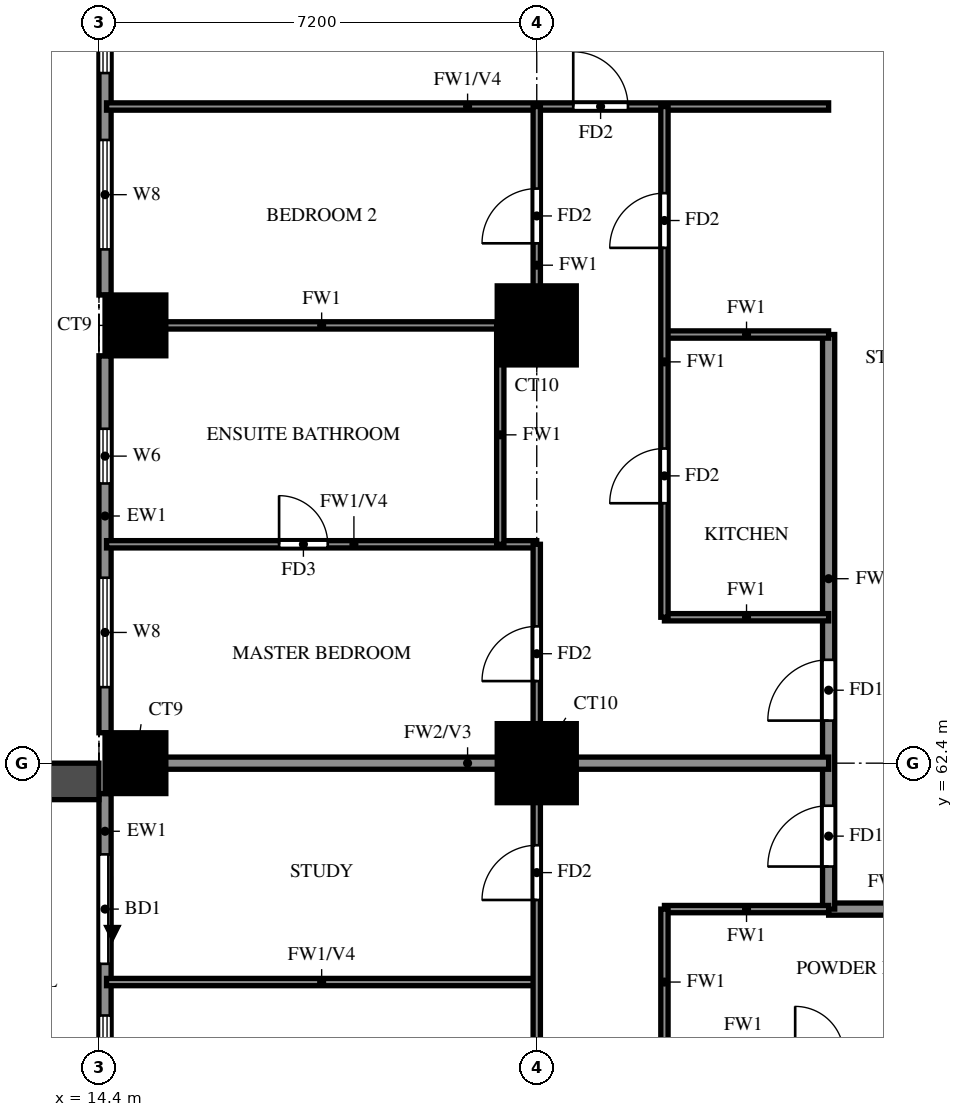
"""IFC4 building model, lengths in metres.
Left out: names, types, materials, properties, quantities, classifications, styles, units other than length and angle.
Written with IfcOpenShell. Run it as: python <this file> out.ifc"""

import sys

from ifc_helpers import new_model, si_unit, direction, frame, frame_2d, origin, origin_2d, place, context, subcontext, project, spatial, rectangle, extrude, source, transform, mapped, element, fill, save


model = new_model("IFC4")
c1 = context("Model", 3, precision=1e-05, world=origin(), true_north=direction((0.0, 1.0)))
c2 = subcontext(c1, "Body", "Model", "MODEL_VIEW")
j1 = project(units=[si_unit("LENGTHUNIT", "METRE"), si_unit("PLANEANGLEUNIT", "RADIAN")], contexts=[c1])
p1 = place(None, origin())
s1 = spatial("IfcSite", under=j1, at=p1, CompositionType="ELEMENT")
p2 = place(p1, origin())
s2 = spatial("IfcBuilding", under=s1, at=p2, CompositionType="ELEMENT")
p3 = place(p2, frame((0.0, 0.0, 90.0)))
s3 = spatial("IfcBuildingStorey", under=s2, at=p3, CompositionType="ELEMENT", Elevation=90.0)
m1 = source(origin(), c2, "Body", "SweptSolid", [
    extrude(rectangle(XDim=1.0, YDim=1.0, at=origin_2d()), origin(), (0.0, 0.0, 1.0), 3.18),
])
p4 = place(p3, frame((15.0, 62.4, 0.0), z_axis=(0.0, 0.0, 1.0), x_axis=(1.0, 0.0, 0.0)))
e1 = element("IfcColumn", 1, at=p4, inside=s3, PredefinedType="COLUMN", context=c2, shape_type="MappedRepresentation", body=[
    mapped(m1, transform((0.0, 0.0, 0.0))),
])
m2 = source(origin(), c2, "Body", "SweptSolid", [
    extrude(rectangle(XDim=1.3, YDim=1.3, at=origin_2d()), origin(), (0.0, 0.0, 1.0), 3.18),
])
p5 = place(p3, frame((21.6, 62.4, 0.0), z_axis=(0.0, 0.0, 1.0), x_axis=(1.0, 0.0, 0.0)))
e2 = element("IfcColumn", 2, at=p5, inside=s3, PredefinedType="COLUMN", context=c2, shape_type="MappedRepresentation", body=[
    mapped(m2, transform((0.0, 0.0, 0.0))),
])
p6 = place(p3, frame((15.0, 69.6, 0.0), z_axis=(0.0, 0.0, 1.0), x_axis=(1.0, 0.0, 0.0)))
e3 = element("IfcColumn", 3, at=p6, inside=s3, PredefinedType="COLUMN", context=c2, shape_type="MappedRepresentation", body=[
    mapped(m1, transform((0.0, 0.0, 0.0))),
])
p7 = place(p3, frame((21.6, 69.6, 0.0), z_axis=(0.0, 0.0, 1.0), x_axis=(1.0, 0.0, 0.0)))
e4 = element("IfcColumn", 4, at=p7, inside=s3, PredefinedType="COLUMN", context=c2, shape_type="MappedRepresentation", body=[
    mapped(m2, transform((0.0, 0.0, 0.0))),
])
p8 = place(p3, frame((14.5, 76.3, 0.0), z_axis=(0.0, 0.0, 1.0), x_axis=(0.0, -1.0, 0.0)))
e5 = element("IfcWall", 5, at=p8, inside=s3, PredefinedType="SOLIDWALL", context=c2, shape_type="SweptSolid", body=[
    extrude(rectangle(XDim=6.2, YDim=0.2, at=frame_2d((3.1, 0.0))), origin(), (0.0, 0.0, 1.0), 3.18),
])
p9 = place(p8, frame((3.65, 0.0, 0.6)))
e6 = element("IfcOpeningElement", 6, at=p9, cuts=e5, PredefinedType="OPENING", context=c2, shape_type="SweptSolid", body=[
    extrude(rectangle(XDim=1.8, YDim=2.4, at=frame_2d((0.9, 1.2))), frame((0.0, 0.11, 0.0), z_axis=(0.0, -1.0, 0.0), x_axis=(1.0, 0.0, 0.0)), (0.0, 0.0, 1.0), 0.22),
])
p10 = place(p8, frame((0.75, 0.0, 0.6)))
e7 = element("IfcOpeningElement", 7, at=p10, cuts=e5, PredefinedType="OPENING", context=c2, shape_type="SweptSolid", body=[
    extrude(rectangle(XDim=1.8, YDim=2.4, at=frame_2d((0.9, 1.2))), frame((0.0, 0.11, 0.0), z_axis=(0.0, -1.0, 0.0), x_axis=(1.0, 0.0, 0.0)), (0.0, 0.0, 1.0), 0.22),
])
p11 = place(p3, frame((14.5, 69.1, 0.0), z_axis=(0.0, 0.0, 1.0), x_axis=(0.0, -1.0, 0.0)))
e8 = element("IfcWall", 8, at=p11, inside=s3, PredefinedType="SOLIDWALL", context=c2, shape_type="SweptSolid", body=[
    extrude(rectangle(XDim=6.2, YDim=0.2, at=frame_2d((3.1, 0.0))), origin(), (0.0, 0.0, 1.0), 3.18),
])
p12 = place(p11, frame((3.65, 0.0, 0.6)))
e9 = element("IfcOpeningElement", 9, at=p12, cuts=e8, PredefinedType="OPENING", context=c2, shape_type="SweptSolid", body=[
    extrude(rectangle(XDim=1.8, YDim=2.4, at=frame_2d((0.9, 1.2))), frame((0.0, 0.11, 0.0), z_axis=(0.0, -1.0, 0.0), x_axis=(1.0, 0.0, 0.0)), (0.0, 0.0, 1.0), 0.22),
])
p13 = place(p11, frame((1.2, 0.0, 1.5)))
e10 = element("IfcOpeningElement", 10, at=p13, cuts=e8, PredefinedType="OPENING", context=c2, shape_type="SweptSolid", body=[
    extrude(rectangle(XDim=0.9, YDim=0.9, at=frame_2d((0.45, 0.45))), frame((0.0, 0.11, 0.0), z_axis=(0.0, -1.0, 0.0), x_axis=(1.0, 0.0, 0.0)), (0.0, 0.0, 1.0), 0.22),
])
p14 = place(p3, frame((14.5, 61.9, 0.0), z_axis=(0.0, 0.0, 1.0), x_axis=(0.0, -1.0, 0.0)))
e11 = element("IfcWall", 11, at=p14, inside=s3, PredefinedType="SOLIDWALL", context=c2, shape_type="SweptSolid", body=[
    extrude(rectangle(XDim=6.2, YDim=0.2, at=frame_2d((3.1, 0.0))), origin(), (0.0, 0.0, 1.0), 3.18),
])
p15 = place(p14, frame((1.0, 0.0, 0.0)))
e12 = element("IfcOpeningElement", 12, at=p15, cuts=e11, PredefinedType="OPENING", context=c2, shape_type="SweptSolid", body=[
    extrude(rectangle(XDim=1.8, YDim=2.4, at=frame_2d((0.9, 1.2))), frame((0.0, 0.11, 0.0), z_axis=(0.0, -1.0, 0.0), x_axis=(1.0, 0.0, 0.0)), (0.0, 0.0, 1.0), 0.22),
])
p16 = place(p14, frame((3.65, 0.0, 0.6)))
e13 = element("IfcOpeningElement", 13, at=p16, cuts=e11, PredefinedType="OPENING", context=c2, shape_type="SweptSolid", body=[
    extrude(rectangle(XDim=1.8, YDim=2.4, at=frame_2d((0.9, 1.2))), frame((0.0, 0.11, 0.0), z_axis=(0.0, -1.0, 0.0), x_axis=(1.0, 0.0, 0.0)), (0.0, 0.0, 1.0), 0.22),
])
p17 = place(p3, frame((14.4, 62.1, 0.0), z_axis=(0.0, 0.0, 1.0), x_axis=(-1.0, 0.0, 0.0)))
e14 = element("IfcWall", 14, at=p17, inside=s3, PredefinedType="SOLIDWALL", context=c2, shape_type="SweptSolid", body=[
    extrude(rectangle(XDim=2.7, YDim=0.6, at=frame_2d((1.35, 0.0))), origin(), (0.0, 0.0, 1.0), 2.85),
])
p18 = place(p3, frame((26.4, 60.0, 0.0), z_axis=(0.0, 0.0, 1.0), x_axis=(1.0, 0.0, 0.0)))
e15 = element("IfcWall", 15, at=p18, inside=s3, PredefinedType="SOLIDWALL", context=c2, shape_type="SweptSolid", body=[
    extrude(rectangle(XDim=2.4, YDim=0.2, at=frame_2d((1.2, 0.0))), origin(), (0.0, 0.0, 1.0), 3.18),
])
p19 = place(p3, frame((26.4, 60.0, 0.0), z_axis=(0.0, 0.0, 1.0), x_axis=(0.0, 1.0, 0.0)))
e16 = element("IfcWall", 16, at=p19, inside=s3, PredefinedType="SOLIDWALL", context=c2, shape_type="SweptSolid", body=[
    extrude(rectangle(XDim=9.45, YDim=0.2, at=frame_2d((4.725, 0.0))), origin(), (0.0, 0.0, 1.0), 3.18),
])
p20 = place(p19, frame((0.7, 0.0, 0.0)))
e17 = element("IfcOpeningElement", 17, at=p20, cuts=e16, PredefinedType="OPENING", context=c2, shape_type="SweptSolid", body=[
    extrude(rectangle(XDim=1.0, YDim=2.1, at=frame_2d((0.5, 1.05))), frame((0.0, 0.11, 0.0), z_axis=(0.0, -1.0, 0.0), x_axis=(1.0, 0.0, 0.0)), (0.0, 0.0, 1.0), 0.22),
])
p21 = place(p19, frame((3.1, 0.0, 0.0)))
e18 = element("IfcOpeningElement", 18, at=p21, cuts=e16, PredefinedType="OPENING", context=c2, shape_type="SweptSolid", body=[
    extrude(rectangle(XDim=1.0, YDim=2.1, at=frame_2d((0.5, 1.05))), frame((0.0, 0.11, 0.0), z_axis=(0.0, -1.0, 0.0), x_axis=(1.0, 0.0, 0.0)), (0.0, 0.0, 1.0), 0.22),
])
p22 = place(p3, frame((14.525, 62.4, 0.0), z_axis=(0.0, 0.0, 1.0), x_axis=(1.0, 0.0, 0.0)))
e19 = element("IfcWall", 19, at=p22, inside=s3, PredefinedType="SOLIDWALL", context=c2, shape_type="SweptSolid", body=[
    extrude(rectangle(XDim=11.875, YDim=0.2, at=frame_2d((5.938, 0.0))), origin(), (0.0, 0.0, 1.0), 3.18),
])
p23 = place(p3, frame((14.525, 58.8, 0.0), z_axis=(0.0, 0.0, 1.0), x_axis=(1.0, 0.0, 0.0)))
e20 = element("IfcWall", 20, at=p23, inside=s3, PredefinedType="PARTITIONING", context=c2, shape_type="SweptSolid", body=[
    extrude(rectangle(XDim=7.075, YDim=0.12, at=frame_2d((3.538, 0.0))), origin(), (0.0, 0.0, 1.0), 2.28),
])
for number, where, z_axis, x_axis in (
    (21, (23.7, 60.0, 0.0), (0.0, 0.0, 1.0), (1.0, 0.0, 0.0)),
    (22, (23.7, 64.8, 0.0), (0.0, 0.0, 1.0), (1.0, 0.0, 0.0)),
):
    element("IfcWall", number, at=place(p3, frame(where, z_axis=z_axis, x_axis=x_axis)), inside=s3, PredefinedType="PARTITIONING", context=c2, shape_type="SweptSolid", body=[
        extrude(rectangle(XDim=2.7, YDim=0.12, at=frame_2d((1.35, 0.0))), origin(), (0.0, 0.0, 1.0), 3.18),
    ])
p24 = place(p3, frame((14.525, 66.0, 0.0), z_axis=(0.0, 0.0, 1.0), x_axis=(1.0, 0.0, 0.0)))
e23 = element("IfcWall", 23, at=p24, inside=s3, PredefinedType="PARTITIONING", context=c2, shape_type="SweptSolid", body=[
    extrude(rectangle(XDim=7.075, YDim=0.12, at=frame_2d((3.538, 0.0))), origin(), (0.0, 0.0, 1.0), 2.28),
])
p25 = place(p24, frame((2.837, 0.0, 0.0)))
e24 = element("IfcOpeningElement", 24, at=p25, cuts=e23, PredefinedType="OPENING", context=c2, shape_type="SweptSolid", body=[
    extrude(rectangle(XDim=0.8, YDim=2.1, at=frame_2d((0.4, 1.05))), frame((0.0, 0.07, 0.0), z_axis=(0.0, -1.0, 0.0), x_axis=(1.0, 0.0, 0.0)), (0.0, 0.0, 1.0), 0.14),
])
p26 = place(p3, frame((23.7, 69.45, 0.0), z_axis=(0.0, 0.0, 1.0), x_axis=(1.0, 0.0, 0.0)))
e25 = element("IfcWall", 25, at=p26, inside=s3, PredefinedType="PARTITIONING", context=c2, shape_type="SweptSolid", body=[
    extrude(rectangle(XDim=2.7, YDim=0.12, at=frame_2d((1.35, 0.0))), origin(), (0.0, 0.0, 1.0), 3.18),
])
p27 = place(p3, frame((14.525, 69.6, 0.0), z_axis=(0.0, 0.0, 1.0), x_axis=(1.0, 0.0, 0.0)))
e26 = element("IfcWall", 26, at=p27, inside=s3, PredefinedType="PARTITIONING", context=c2, shape_type="SweptSolid", body=[
    extrude(rectangle(XDim=7.075, YDim=0.12, at=frame_2d((3.538, 0.0))), origin(), (0.0, 0.0, 1.0), 3.18),
])
p28 = place(p3, frame((14.525, 73.2, 0.0), z_axis=(0.0, 0.0, 1.0), x_axis=(1.0, 0.0, 0.0)))
e27 = element("IfcWall", 27, at=p28, inside=s3, PredefinedType="PARTITIONING", context=c2, shape_type="SweptSolid", body=[
    extrude(rectangle(XDim=11.875, YDim=0.12, at=frame_2d((5.938, 0.0))), origin(), (0.0, 0.0, 1.0), 2.28),
])
p29 = place(p28, frame((7.675, 0.0, 0.0)))
e28 = element("IfcOpeningElement", 28, at=p29, cuts=e27, PredefinedType="OPENING", context=c2, shape_type="SweptSolid", body=[
    extrude(rectangle(XDim=0.9, YDim=2.1, at=frame_2d((0.45, 1.05))), frame((0.0, 0.07, 0.0), z_axis=(0.0, -1.0, 0.0), x_axis=(1.0, 0.0, 0.0)), (0.0, 0.0, 1.0), 0.14),
])
p30 = place(p3, frame((21.0, 66.0, 0.0), z_axis=(0.0, 0.0, 1.0), x_axis=(0.0, 1.0, 0.0)))
e29 = element("IfcWall", 29, at=p30, inside=s3, PredefinedType="PARTITIONING", context=c2, shape_type="SweptSolid", body=[
    extrude(rectangle(XDim=3.6, YDim=0.12, at=frame_2d((1.8, 0.0))), origin(), (0.0, 0.0, 1.0), 3.18),
])
p31 = place(p3, frame((21.6, 33.725, 0.0), z_axis=(0.0, 0.0, 1.0), x_axis=(0.0, 1.0, 0.0)))
e30 = element("IfcWall", 30, at=p31, inside=s3, PredefinedType="PARTITIONING", context=c2, shape_type="SweptSolid", body=[
    extrude(rectangle(XDim=32.275, YDim=0.12, at=frame_2d((16.137, 0.0))), origin(), (0.0, 0.0, 1.0), 3.18),
])
p32 = place(p31, frame((7.775, 0.0, 0.0)))
e31 = element("IfcOpeningElement", 31, at=p32, cuts=e30, PredefinedType="OPENING", context=c2, shape_type="SweptSolid", body=[
    extrude(rectangle(XDim=0.9, YDim=2.1, at=frame_2d((0.45, 1.05))), frame((0.0, 0.07, 0.0), z_axis=(0.0, -1.0, 0.0), x_axis=(1.0, 0.0, 0.0)), (0.0, 0.0, 1.0), 0.14),
])
p33 = place(p31, frame((15.625, 0.0, 0.0)))
e32 = element("IfcOpeningElement", 32, at=p33, cuts=e30, PredefinedType="OPENING", context=c2, shape_type="SweptSolid", body=[
    extrude(rectangle(XDim=0.9, YDim=2.1, at=frame_2d((0.45, 1.05))), frame((0.0, 0.07, 0.0), z_axis=(0.0, -1.0, 0.0), x_axis=(1.0, 0.0, 0.0)), (0.0, 0.0, 1.0), 0.14),
])
p34 = place(p31, frame((22.225, 0.0, 0.0)))
e33 = element("IfcOpeningElement", 33, at=p34, cuts=e30, PredefinedType="OPENING", context=c2, shape_type="SweptSolid", body=[
    extrude(rectangle(XDim=1.5, YDim=2.1, at=frame_2d((0.75, 1.05))), frame((0.0, 0.07, 0.0), z_axis=(0.0, -1.0, 0.0), x_axis=(1.0, 0.0, 0.0)), (0.0, 0.0, 1.0), 0.14),
])
p35 = place(p31, frame((26.425, 0.0, 0.0)))
e34 = element("IfcOpeningElement", 34, at=p35, cuts=e30, PredefinedType="OPENING", context=c2, shape_type="SweptSolid", body=[
    extrude(rectangle(XDim=0.9, YDim=2.1, at=frame_2d((0.45, 1.05))), frame((0.0, 0.07, 0.0), z_axis=(0.0, -1.0, 0.0), x_axis=(1.0, 0.0, 0.0)), (0.0, 0.0, 1.0), 0.14),
])
p36 = place(p31, frame((30.025, 0.0, 0.0)))
e35 = element("IfcOpeningElement", 35, at=p36, cuts=e30, PredefinedType="OPENING", context=c2, shape_type="SweptSolid", body=[
    extrude(rectangle(XDim=0.9, YDim=2.1, at=frame_2d((0.45, 1.05))), frame((0.0, 0.07, 0.0), z_axis=(0.0, -1.0, 0.0), x_axis=(1.0, 0.0, 0.0)), (0.0, 0.0, 1.0), 0.14),
])
p37 = place(p3, frame((21.6, 69.6, 0.0), z_axis=(0.0, 0.0, 1.0), x_axis=(0.0, 1.0, 0.0)))
e36 = element("IfcWall", 36, at=p37, inside=s3, PredefinedType="PARTITIONING", context=c2, shape_type="SweptSolid", body=[
    extrude(rectangle(XDim=3.6, YDim=0.12, at=frame_2d((1.8, 0.0))), origin(), (0.0, 0.0, 1.0), 3.18),
])
p38 = place(p37, frame((1.35, 0.0, 0.0)))
e37 = element("IfcOpeningElement", 37, at=p38, cuts=e36, PredefinedType="OPENING", context=c2, shape_type="SweptSolid", body=[
    extrude(rectangle(XDim=0.9, YDim=2.1, at=frame_2d((0.45, 1.05))), frame((0.0, 0.07, 0.0), z_axis=(0.0, -1.0, 0.0), x_axis=(1.0, 0.0, 0.0)), (0.0, 0.0, 1.0), 0.14),
])
p39 = place(p3, frame((23.7, 57.6, 0.0), z_axis=(0.0, 0.0, 1.0), x_axis=(0.0, 1.0, 0.0)))
e38 = element("IfcWall", 38, at=p39, inside=s3, PredefinedType="PARTITIONING", context=c2, shape_type="SweptSolid", body=[
    extrude(rectangle(XDim=2.4, YDim=0.12, at=frame_2d((1.2, 0.0))), origin(), (0.0, 0.0, 1.0), 3.18),
])
p40 = place(p3, frame((23.7, 64.8, 0.0), z_axis=(0.0, 0.0, 1.0), x_axis=(0.0, 1.0, 0.0)))
e39 = element("IfcWall", 39, at=p40, inside=s3, PredefinedType="PARTITIONING", context=c2, shape_type="SweptSolid", body=[
    extrude(rectangle(XDim=8.4, YDim=0.12, at=frame_2d((4.2, 0.0))), origin(), (0.0, 0.0, 1.0), 3.18),
])
p41 = place(p40, frame((1.875, 0.0, 0.0)))
e40 = element("IfcOpeningElement", 40, at=p41, cuts=e39, PredefinedType="OPENING", context=c2, shape_type="SweptSolid", body=[
    extrude(rectangle(XDim=0.9, YDim=2.1, at=frame_2d((0.45, 1.05))), frame((0.0, 0.07, 0.0), z_axis=(0.0, -1.0, 0.0), x_axis=(1.0, 0.0, 0.0)), (0.0, 0.0, 1.0), 0.14),
])
p42 = place(p40, frame((6.075, 0.0, 0.0)))
e41 = element("IfcOpeningElement", 41, at=p42, cuts=e39, PredefinedType="OPENING", context=c2, shape_type="SweptSolid", body=[
    extrude(rectangle(XDim=0.9, YDim=2.1, at=frame_2d((0.45, 1.05))), frame((0.0, 0.07, 0.0), z_axis=(0.0, -1.0, 0.0), x_axis=(1.0, 0.0, 0.0)), (0.0, 0.0, 1.0), 0.14),
])
p43 = place(p9, origin())
e42 = element("IfcWindow", 42, at=p43, inside=s3, PartitioningType="DOUBLE_PANEL_VERTICAL", PredefinedType="WINDOW", context=c2, shape_type="SweptSolid", body=[
    extrude(rectangle(XDim=1.8, YDim=2.4, at=frame_2d((0.9, 1.2))), frame((0.0, 0.03, 0.0), z_axis=(0.0, -1.0, 0.0), x_axis=(1.0, 0.0, 0.0)), (0.0, 0.0, 1.0), 0.06),
])
fill(e6, e42)
p44 = place(p10, origin())
e43 = element("IfcWindow", 43, at=p44, inside=s3, PartitioningType="DOUBLE_PANEL_VERTICAL", PredefinedType="WINDOW", context=c2, shape_type="SweptSolid", body=[
    extrude(rectangle(XDim=1.8, YDim=2.4, at=frame_2d((0.9, 1.2))), frame((0.0, 0.03, 0.0), z_axis=(0.0, -1.0, 0.0), x_axis=(1.0, 0.0, 0.0)), (0.0, 0.0, 1.0), 0.06),
])
fill(e7, e43)
p45 = place(p12, origin())
e44 = element("IfcWindow", 44, at=p45, inside=s3, PartitioningType="DOUBLE_PANEL_VERTICAL", PredefinedType="WINDOW", context=c2, shape_type="SweptSolid", body=[
    extrude(rectangle(XDim=1.8, YDim=2.4, at=frame_2d((0.9, 1.2))), frame((0.0, 0.03, 0.0), z_axis=(0.0, -1.0, 0.0), x_axis=(1.0, 0.0, 0.0)), (0.0, 0.0, 1.0), 0.06),
])
fill(e9, e44)
p46 = place(p13, origin())
e45 = element("IfcWindow", 45, at=p46, inside=s3, PartitioningType="SINGLE_PANEL", PredefinedType="WINDOW", context=c2, shape_type="SweptSolid", body=[
    extrude(rectangle(XDim=0.9, YDim=0.9, at=frame_2d((0.45, 0.45))), frame((0.0, 0.03, 0.0), z_axis=(0.0, -1.0, 0.0), x_axis=(1.0, 0.0, 0.0)), (0.0, 0.0, 1.0), 0.06),
])
fill(e10, e45)
p47 = place(p15, origin())
e46 = element("IfcDoor", 46, at=p47, inside=s3, OperationType="DOUBLE_DOOR_SLIDING", PredefinedType="DOOR", context=c2, shape_type="SweptSolid", body=[
    extrude(rectangle(XDim=1.8, YDim=2.4, at=frame_2d((0.9, 1.2))), frame((0.0, 0.025, 0.0), z_axis=(0.0, -1.0, 0.0), x_axis=(1.0, 0.0, 0.0)), (0.0, 0.0, 1.0), 0.05),
])
fill(e12, e46)
p48 = place(p16, origin())
e47 = element("IfcWindow", 47, at=p48, inside=s3, PartitioningType="DOUBLE_PANEL_VERTICAL", PredefinedType="WINDOW", context=c2, shape_type="SweptSolid", body=[
    extrude(rectangle(XDim=1.8, YDim=2.4, at=frame_2d((0.9, 1.2))), frame((0.0, 0.03, 0.0), z_axis=(0.0, -1.0, 0.0), x_axis=(1.0, 0.0, 0.0)), (0.0, 0.0, 1.0), 0.06),
])
fill(e13, e47)
p49 = place(p20, origin())
e48 = element("IfcDoor", 48, at=p49, inside=s3, OperationType="SINGLE_SWING_LEFT", PredefinedType="DOOR", context=c2, shape_type="SweptSolid", body=[
    extrude(rectangle(XDim=1.0, YDim=2.1, at=frame_2d((0.5, 1.05))), frame((0.0, 0.025, 0.0), z_axis=(0.0, -1.0, 0.0), x_axis=(1.0, 0.0, 0.0)), (0.0, 0.0, 1.0), 0.05),
])
fill(e17, e48)
p50 = place(p35, origin())
e49 = element("IfcDoor", 49, at=p50, inside=s3, OperationType="SINGLE_SWING_LEFT", PredefinedType="DOOR", context=c2, shape_type="SweptSolid", body=[
    extrude(rectangle(XDim=0.9, YDim=2.1, at=frame_2d((0.45, 1.05))), frame((0.0, 0.025, 0.0), z_axis=(0.0, -1.0, 0.0), x_axis=(1.0, 0.0, 0.0)), (0.0, 0.0, 1.0), 0.05),
])
fill(e34, e49)
p51 = place(p21, origin())
e50 = element("IfcDoor", 50, at=p51, inside=s3, OperationType="SINGLE_SWING_LEFT", PredefinedType="DOOR", context=c2, shape_type="SweptSolid", body=[
    extrude(rectangle(XDim=1.0, YDim=2.1, at=frame_2d((0.5, 1.05))), frame((0.0, 0.025, 0.0), z_axis=(0.0, -1.0, 0.0), x_axis=(1.0, 0.0, 0.0)), (0.0, 0.0, 1.0), 0.05),
])
fill(e18, e50)
p52 = place(p36, origin())
e51 = element("IfcDoor", 51, at=p52, inside=s3, OperationType="SINGLE_SWING_LEFT", PredefinedType="DOOR", context=c2, shape_type="SweptSolid", body=[
    extrude(rectangle(XDim=0.9, YDim=2.1, at=frame_2d((0.45, 1.05))), frame((0.0, 0.025, 0.0), z_axis=(0.0, -1.0, 0.0), x_axis=(1.0, 0.0, 0.0)), (0.0, 0.0, 1.0), 0.05),
])
fill(e35, e51)
p53 = place(p25, origin())
e52 = element("IfcDoor", 52, at=p53, inside=s3, OperationType="SINGLE_SWING_RIGHT", PredefinedType="DOOR", context=c2, shape_type="SweptSolid", body=[
    extrude(rectangle(XDim=0.8, YDim=2.1, at=frame_2d((0.4, 1.05))), frame((0.0, 0.025, 0.0), z_axis=(0.0, -1.0, 0.0), x_axis=(1.0, 0.0, 0.0)), (0.0, 0.0, 1.0), 0.05),
])
fill(e24, e52)
p54 = place(p38, origin())
e53 = element("IfcDoor", 53, at=p54, inside=s3, OperationType="SINGLE_SWING_LEFT", PredefinedType="DOOR", context=c2, shape_type="SweptSolid", body=[
    extrude(rectangle(XDim=0.9, YDim=2.1, at=frame_2d((0.45, 1.05))), frame((0.0, 0.025, 0.0), z_axis=(0.0, -1.0, 0.0), x_axis=(1.0, 0.0, 0.0)), (0.0, 0.0, 1.0), 0.05),
])
fill(e37, e53)
p55 = place(p29, origin())
e54 = element("IfcDoor", 54, at=p55, inside=s3, OperationType="SINGLE_SWING_LEFT", PredefinedType="DOOR", context=c2, shape_type="SweptSolid", body=[
    extrude(rectangle(XDim=0.9, YDim=2.1, at=frame_2d((0.45, 1.05))), frame((0.0, 0.025, 0.0), z_axis=(0.0, -1.0, 0.0), x_axis=(1.0, 0.0, 0.0)), (0.0, 0.0, 1.0), 0.05),
])
fill(e28, e54)
p56 = place(p41, origin())
e55 = element("IfcDoor", 55, at=p56, inside=s3, OperationType="SINGLE_SWING_RIGHT", PredefinedType="DOOR", context=c2, shape_type="SweptSolid", body=[
    extrude(rectangle(XDim=0.9, YDim=2.1, at=frame_2d((0.45, 1.05))), frame((0.0, 0.025, 0.0), z_axis=(0.0, -1.0, 0.0), x_axis=(1.0, 0.0, 0.0)), (0.0, 0.0, 1.0), 0.05),
])
fill(e40, e55)
p57 = place(p42, origin())
e56 = element("IfcDoor", 56, at=p57, inside=s3, OperationType="SINGLE_SWING_LEFT", PredefinedType="DOOR", context=c2, shape_type="SweptSolid", body=[
    extrude(rectangle(XDim=0.9, YDim=2.1, at=frame_2d((0.45, 1.05))), frame((0.0, 0.025, 0.0), z_axis=(0.0, -1.0, 0.0), x_axis=(1.0, 0.0, 0.0)), (0.0, 0.0, 1.0), 0.05),
])
fill(e41, e56)
save(model, sys.argv[1])
